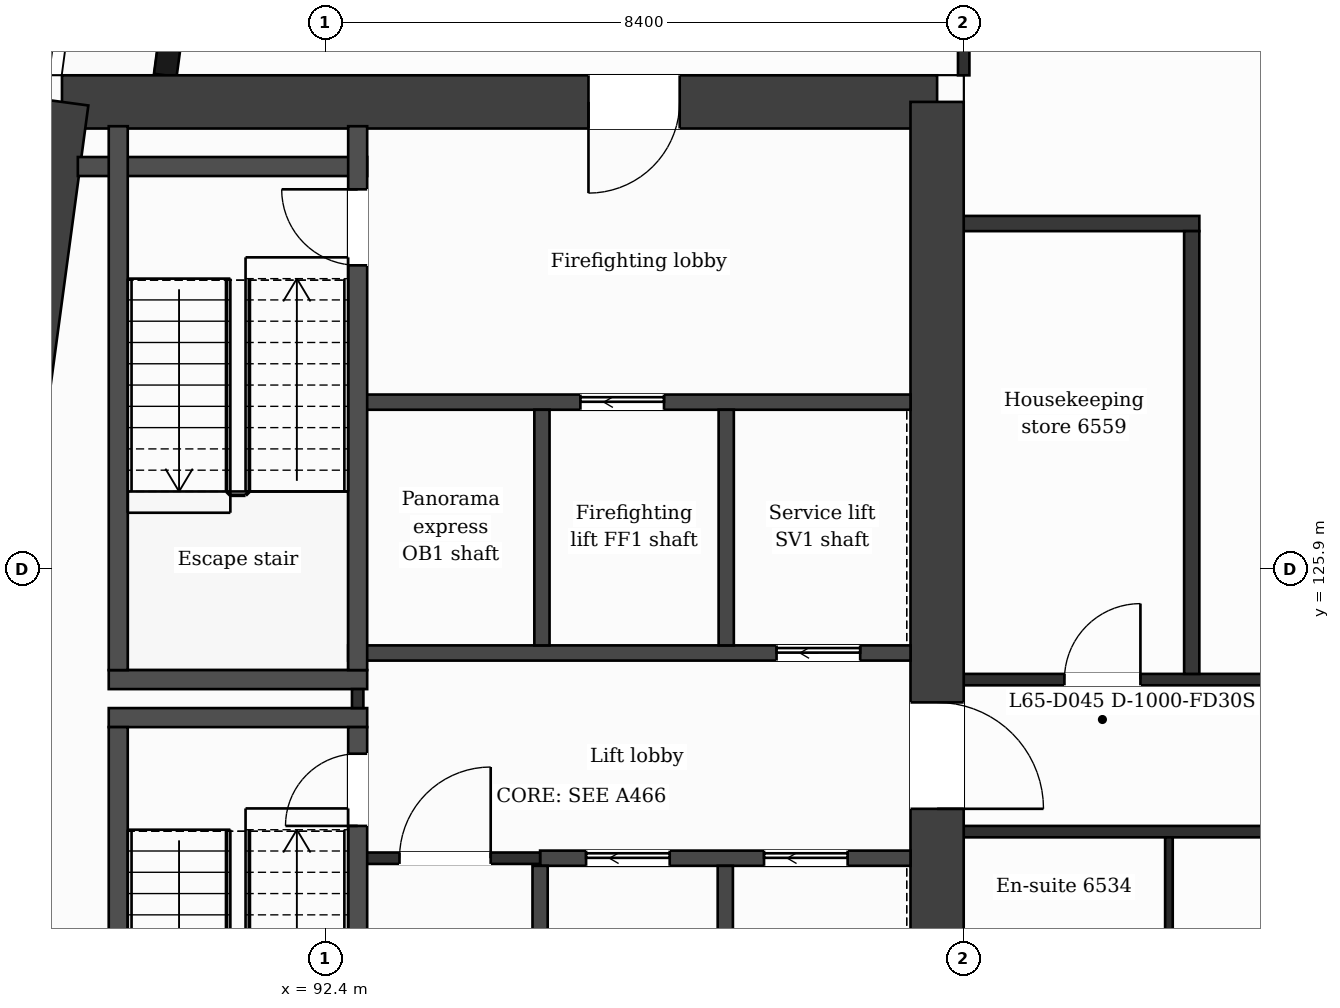
"""IFC4 building model, lengths in metres.
Left out: names, types, materials, properties, quantities, classifications, styles, units other than length and angle.
Written with IfcOpenShell. Run it as: python <this file> out.ifc"""

import sys

from ifc_helpers import new_model, si_unit, direction, frame, frame_2d, origin, place, context, subcontext, project, spatial, rectangle, extrude, element, fill, save


model = new_model("IFC4")
c1 = context("Model", 3, precision=1e-05, world=origin(), true_north=direction((0.0, 1.0)))
c2 = subcontext(c1, "Body", "Model", "MODEL_VIEW")
j1 = project(units=[si_unit("LENGTHUNIT", "METRE"), si_unit("PLANEANGLEUNIT", "RADIAN")], contexts=[c1])
p1 = place(None, origin())
s1 = spatial("IfcSite", under=j1, at=p1, CompositionType="ELEMENT")
p2 = place(p1, origin())
s2 = spatial("IfcBuilding", under=s1, at=p2, CompositionType="ELEMENT")
p3 = place(p2, frame((0.0, 0.0, 270.1)))
s3 = spatial("IfcBuildingStorey", under=s2, at=p3, CompositionType="ELEMENT", Elevation=270.1)
p4 = place(p3, frame((88.937, 132.05, 0.0), z_axis=(0.0, 0.0, 1.0), x_axis=(1.0, 0.0, 0.0)))
e1 = element("IfcWall", 1, at=p4, inside=s3, PredefinedType="SHEAR", context=c2, shape_type="SweptSolid", body=[
    extrude(rectangle(XDim=11.513, YDim=0.7, at=frame_2d((5.757, 0.0))), origin(), (0.0, 0.0, 1.0), 3.7),
])
p5 = place(p4, frame((6.927, 0.0, 0.0)))
e2 = element("IfcOpeningElement", 2, at=p5, cuts=e1, PredefinedType="OPENING", context=c2, shape_type="SweptSolid", body=[
    extrude(rectangle(XDim=1.2, YDim=2.1, at=frame_2d((0.6, 1.05))), frame((0.0, 0.36, 0.0), z_axis=(0.0, -1.0, 0.0), x_axis=(1.0, 0.0, 0.0)), (0.0, 0.0, 1.0), 0.72),
])
p6 = place(p3, frame((100.45, 132.05, 0.0), z_axis=(0.0, 0.0, 1.0), x_axis=(0.0, -1.0, 0.0)))
e3 = element("IfcWall", 3, at=p6, inside=s3, PredefinedType="SHEAR", context=c2, shape_type="SweptSolid", body=[
    extrude(rectangle(XDim=21.3, YDim=0.7, at=frame_2d((10.65, 0.0))), origin(), (0.0, 0.0, 1.0), 3.7),
])
p7 = place(p6, frame((7.9, 0.0, 0.0)))
e4 = element("IfcOpeningElement", 4, at=p7, cuts=e3, PredefinedType="OPENING", context=c2, shape_type="SweptSolid", body=[
    extrude(rectangle(XDim=1.4, YDim=2.1, at=frame_2d((0.7, 1.05))), frame((0.0, 0.36, 0.0), z_axis=(0.0, -1.0, 0.0), x_axis=(1.0, 0.0, 0.0)), (0.0, 0.0, 1.0), 0.72),
])
p8 = place(p3, frame((86.07, 110.75, 0.0), z_axis=(0.0, 0.0, 1.0), x_axis=(0.133406218907, 0.991061441464, 0.0)))
e5 = element("IfcWall", 5, at=p8, inside=s3, PredefinedType="SHEAR", context=c2, shape_type="SweptSolid", body=[
    extrude(rectangle(XDim=21.492, YDim=0.7, at=frame_2d((10.746, 0.0))), origin(), (0.0, 0.0, 1.0), 3.7),
])
p9 = place(p3, frame((91.177, 138.95, 0.0), z_axis=(0.0, 0.0, 1.0), x_axis=(-0.133426664613, -0.991058689065, 0.0)))
e6 = element("IfcWall", 6, at=p9, inside=s3, PredefinedType="SOLIDWALL", context=c2, shape_type="SweptSolid", body=[
    extrude(rectangle(XDim=6.609, YDim=0.3, at=frame_2d((3.305, 0.0))), origin(), (0.0, 0.0, 1.0), 3.38),
])
p10 = place(p9, frame((1.039, 0.0, 0.9)))
e7 = element("IfcOpeningElement", 7, at=p10, cuts=e6, PredefinedType="OPENING", context=c2, shape_type="SweptSolid", body=[
    extrude(rectangle(XDim=1.2, YDim=2.1, at=frame_2d((0.6, 1.05))), frame((0.0, 0.16, 0.0), z_axis=(0.0, -1.0, 0.0), x_axis=(1.0, 0.0, 0.0)), (0.0, 0.0, 1.0), 0.32),
])
p11 = place(p9, frame((4.294, 0.0, 0.0)))
e8 = element("IfcOpeningElement", 8, at=p11, cuts=e6, PredefinedType="OPENING", context=c2, shape_type="SweptSolid", body=[
    extrude(rectangle(XDim=1.2, YDim=2.4, at=frame_2d((0.6, 1.2))), frame((0.0, 0.16, 0.0), z_axis=(0.0, -1.0, 0.0), x_axis=(1.0, 0.0, 0.0)), (0.0, 0.0, 1.0), 0.32),
])
p12 = place(p3, frame((95.227, 122.1, 0.0), z_axis=(0.0, 0.0, 1.0), x_axis=(1.0, 0.0, 0.0)))
e9 = element("IfcWall", 9, at=p12, inside=s3, PredefinedType="PARTITIONING", context=c2, shape_type="SweptSolid", body=[
    extrude(rectangle(XDim=4.873, YDim=0.2, at=frame_2d((2.437, 0.0))), origin(), (0.0, 0.0, 1.0), 3.38),
])
p13 = place(p12, frame((0.605, 0.0, 0.0)))
e10 = element("IfcOpeningElement", 10, at=p13, cuts=e9, PredefinedType="OPENING", context=c2, shape_type="SweptSolid", body=[
    extrude(rectangle(XDim=1.1, YDim=2.1, at=frame_2d((0.55, 1.05))), frame((0.0, 0.11, 0.0), z_axis=(0.0, -1.0, 0.0), x_axis=(1.0, 0.0, 0.0)), (0.0, 0.0, 1.0), 0.22),
])
p14 = place(p12, frame((2.946, 0.0, 0.0)))
e11 = element("IfcOpeningElement", 11, at=p14, cuts=e9, PredefinedType="OPENING", context=c2, shape_type="SweptSolid", body=[
    extrude(rectangle(XDim=1.1, YDim=2.1, at=frame_2d((0.55, 1.05))), frame((0.0, 0.11, 0.0), z_axis=(0.0, -1.0, 0.0), x_axis=(1.0, 0.0, 0.0)), (0.0, 0.0, 1.0), 0.22),
])
p15 = place(p3, frame((92.827, 122.1, 0.0), z_axis=(0.0, 0.0, 1.0), x_axis=(1.0, 0.0, 0.0)))
e12 = element("IfcWall", 12, at=p15, inside=s3, PredefinedType="PARTITIONING", context=c2, shape_type="SweptSolid", body=[
    extrude(rectangle(XDim=2.4, YDim=0.15, at=frame_2d((1.2, 0.0))), origin(), (0.0, 0.0, 1.0), 3.38),
])
p16 = place(p15, frame((0.55, 0.0, 0.0)))
e13 = element("IfcOpeningElement", 13, at=p16, cuts=e12, PredefinedType="OPENING", context=c2, shape_type="SweptSolid", body=[
    extrude(rectangle(XDim=1.2, YDim=2.1, at=frame_2d((0.6, 1.05))), frame((0.0, 0.085, 0.0), z_axis=(0.0, -1.0, 0.0), x_axis=(1.0, 0.0, 0.0)), (0.0, 0.0, 1.0), 0.17),
])
p17 = place(p3, frame((100.8, 122.45, 0.0), z_axis=(0.0, 0.0, 1.0), x_axis=(1.0, 0.0, 0.0)))
e14 = element("IfcWall", 14, at=p17, inside=s3, PredefinedType="PARTITIONING", context=c2, shape_type="SweptSolid", body=[
    extrude(rectangle(XDim=25.2, YDim=0.15, at=frame_2d((12.6, 0.0))), origin(), (0.0, 0.0, 1.0), 3.38),
])
p18 = place(p17, frame((5.55, 0.0, 0.0)))
e15 = element("IfcOpeningElement", 15, at=p18, cuts=e14, PredefinedType="OPENING", context=c2, shape_type="SweptSolid", body=[
    extrude(rectangle(XDim=1.0, YDim=2.1, at=frame_2d((0.5, 1.05))), frame((0.0, 0.085, 0.0), z_axis=(0.0, -1.0, 0.0), x_axis=(1.0, 0.0, 0.0)), (0.0, 0.0, 1.0), 0.17),
])
p19 = place(p17, frame((8.862, 0.0, 0.0)))
e16 = element("IfcOpeningElement", 16, at=p19, cuts=e14, PredefinedType="OPENING", context=c2, shape_type="SweptSolid", body=[
    extrude(rectangle(XDim=0.95, YDim=2.1, at=frame_2d((0.475, 1.05))), frame((0.0, 0.085, 0.0), z_axis=(0.0, -1.0, 0.0), x_axis=(1.0, 0.0, 0.0)), (0.0, 0.0, 1.0), 0.17),
])
p20 = place(p17, frame((15.2, 0.0, 0.0)))
e17 = element("IfcOpeningElement", 17, at=p20, cuts=e14, PredefinedType="OPENING", context=c2, shape_type="SweptSolid", body=[
    extrude(rectangle(XDim=0.95, YDim=2.1, at=frame_2d((0.475, 1.05))), frame((0.0, 0.085, 0.0), z_axis=(0.0, -1.0, 0.0), x_axis=(1.0, 0.0, 0.0)), (0.0, 0.0, 1.0), 0.17),
])
p21 = place(p17, frame((17.325, 0.0, 0.0)))
e18 = element("IfcOpeningElement", 18, at=p21, cuts=e14, PredefinedType="OPENING", context=c2, shape_type="SweptSolid", body=[
    extrude(rectangle(XDim=1.0, YDim=2.1, at=frame_2d((0.5, 1.05))), frame((0.0, 0.085, 0.0), z_axis=(0.0, -1.0, 0.0), x_axis=(1.0, 0.0, 0.0)), (0.0, 0.0, 1.0), 0.17),
])
p22 = place(p17, frame((23.862, 0.0, 0.0)))
e19 = element("IfcOpeningElement", 19, at=p22, cuts=e14, PredefinedType="OPENING", context=c2, shape_type="SweptSolid", body=[
    extrude(rectangle(XDim=0.95, YDim=2.1, at=frame_2d((0.475, 1.05))), frame((0.0, 0.085, 0.0), z_axis=(0.0, -1.0, 0.0), x_axis=(1.0, 0.0, 0.0)), (0.0, 0.0, 1.0), 0.17),
])
for number, where, z_axis, x_axis in (
    (20, (89.552, 123.95, 0.0), (0.0, 0.0, 1.0), (1.0, 0.0, 0.0)),
    (21, (89.552, 124.45, 0.0), (0.0, 0.0, 1.0), (1.0, 0.0, 0.0)),
):
    element("IfcWall", number, at=place(p3, frame(where, z_axis=z_axis, x_axis=x_axis)), inside=s3, PredefinedType="PARTITIONING", context=c2, shape_type="SweptSolid", body=[
        extrude(rectangle(XDim=3.4, YDim=0.25, at=frame_2d((1.7, 0.0))), origin(), (0.0, 0.0, 1.0), 3.38),
    ])
p23 = place(p3, frame((100.8, 124.45, 0.0), z_axis=(0.0, 0.0, 1.0), x_axis=(1.0, 0.0, 0.0)))
e22 = element("IfcWall", 22, at=p23, inside=s3, PredefinedType="PARTITIONING", context=c2, shape_type="SweptSolid", body=[
    extrude(rectangle(XDim=25.2, YDim=0.15, at=frame_2d((12.6, 0.0))), origin(), (0.0, 0.0, 1.0), 3.38),
])
p24 = place(p23, frame((6.125, 0.0, 0.0)))
e23 = element("IfcOpeningElement", 23, at=p24, cuts=e22, PredefinedType="OPENING", context=c2, shape_type="SweptSolid", body=[
    extrude(rectangle(XDim=1.0, YDim=2.1, at=frame_2d((0.5, 1.05))), frame((0.0, 0.085, 0.0), z_axis=(0.0, -1.0, 0.0), x_axis=(1.0, 0.0, 0.0)), (0.0, 0.0, 1.0), 0.17),
])
p25 = place(p23, frame((1.325, 0.0, 0.0)))
e24 = element("IfcOpeningElement", 24, at=p25, cuts=e22, PredefinedType="OPENING", context=c2, shape_type="SweptSolid", body=[
    extrude(rectangle(XDim=1.0, YDim=2.1, at=frame_2d((0.5, 1.05))), frame((0.0, 0.085, 0.0), z_axis=(0.0, -1.0, 0.0), x_axis=(1.0, 0.0, 0.0)), (0.0, 0.0, 1.0), 0.17),
])
p26 = place(p23, frame((11.43, 0.0, 0.0)))
e25 = element("IfcOpeningElement", 25, at=p26, cuts=e22, PredefinedType="OPENING", context=c2, shape_type="SweptSolid", body=[
    extrude(rectangle(XDim=1.0, YDim=2.1, at=frame_2d((0.5, 1.05))), frame((0.0, 0.085, 0.0), z_axis=(0.0, -1.0, 0.0), x_axis=(1.0, 0.0, 0.0)), (0.0, 0.0, 1.0), 0.17),
])
p27 = place(p23, frame((21.17, 0.0, 0.0)))
e26 = element("IfcOpeningElement", 26, at=p27, cuts=e22, PredefinedType="OPENING", context=c2, shape_type="SweptSolid", body=[
    extrude(rectangle(XDim=1.0, YDim=2.1, at=frame_2d((0.5, 1.05))), frame((0.0, 0.085, 0.0), z_axis=(0.0, -1.0, 0.0), x_axis=(1.0, 0.0, 0.0)), (0.0, 0.0, 1.0), 0.17),
])
p28 = place(p3, frame((92.702, 124.8, 0.0), z_axis=(0.0, 0.0, 1.0), x_axis=(1.0, 0.0, 0.0)))
e27 = element("IfcWall", 27, at=p28, inside=s3, PredefinedType="PARTITIONING", context=c2, shape_type="SweptSolid", body=[
    extrude(rectangle(XDim=7.398, YDim=0.2, at=frame_2d((3.699, 0.0))), origin(), (0.0, 0.0, 1.0), 3.38),
])
p29 = place(p28, frame((5.636, 0.0, 0.0)))
e28 = element("IfcOpeningElement", 28, at=p29, cuts=e27, PredefinedType="OPENING", context=c2, shape_type="SweptSolid", body=[
    extrude(rectangle(XDim=1.1, YDim=2.1, at=frame_2d((0.55, 1.05))), frame((0.0, 0.11, 0.0), z_axis=(0.0, -1.0, 0.0), x_axis=(1.0, 0.0, 0.0)), (0.0, 0.0, 1.0), 0.22),
])
p30 = place(p3, frame((92.827, 128.1, 0.0), z_axis=(0.0, 0.0, 1.0), x_axis=(1.0, 0.0, 0.0)))
e29 = element("IfcWall", 29, at=p30, inside=s3, PredefinedType="PARTITIONING", context=c2, shape_type="SweptSolid", body=[
    extrude(rectangle(XDim=7.273, YDim=0.2, at=frame_2d((3.637, 0.0))), origin(), (0.0, 0.0, 1.0), 3.38),
])
p31 = place(p30, frame((2.93, 0.0, 0.0)))
e30 = element("IfcOpeningElement", 30, at=p31, cuts=e29, PredefinedType="OPENING", context=c2, shape_type="SweptSolid", body=[
    extrude(rectangle(XDim=1.1, YDim=2.1, at=frame_2d((0.55, 1.05))), frame((0.0, 0.11, 0.0), z_axis=(0.0, -1.0, 0.0), x_axis=(1.0, 0.0, 0.0)), (0.0, 0.0, 1.0), 0.22),
])
p32 = place(p3, frame((100.8, 130.45, 0.0), z_axis=(0.0, 0.0, 1.0), x_axis=(1.0, 0.0, 0.0)))
e31 = element("IfcWall", 31, at=p32, inside=s3, PredefinedType="PARTITIONING", context=c2, shape_type="SweptSolid", body=[
    extrude(rectangle(XDim=3.1, YDim=0.2, at=frame_2d((1.55, 0.0))), origin(), (0.0, 0.0, 1.0), 3.38),
])
p33 = place(p3, frame((89.146, 131.2, 0.0), z_axis=(0.0, 0.0, 1.0), x_axis=(1.0, 0.0, 0.0)))
e32 = element("IfcWall", 32, at=p33, inside=s3, PredefinedType="PARTITIONING", context=c2, shape_type="SweptSolid", body=[
    extrude(rectangle(XDim=3.806, YDim=0.25, at=frame_2d((1.903, 0.0))), origin(), (0.0, 0.0, 1.0), 3.38),
])
for number, where, z_axis, x_axis in (
    (33, (89.677, 116.67, 0.0), (0.0, 0.0, 1.0), (0.0, 1.0, 0.0)),
    (34, (89.677, 124.575, 0.0), (0.0, 0.0, 1.0), (0.0, 1.0, 0.0)),
):
    element("IfcWall", number, at=place(p3, frame(where, z_axis=z_axis, x_axis=x_axis)), inside=s3, PredefinedType="PARTITIONING", context=c2, shape_type="SweptSolid", body=[
        extrude(rectangle(XDim=7.155, YDim=0.25, at=frame_2d((3.578, 0.0))), origin(), (0.0, 0.0, 1.0), 3.38),
    ])
p34 = place(p3, frame((92.827, 124.075, 0.0), z_axis=(0.0, 0.0, 1.0), x_axis=(0.0, 1.0, 0.0)))
e35 = element("IfcWall", 35, at=p34, inside=s3, PredefinedType="PARTITIONING", context=c2, shape_type="SweptSolid", body=[
    extrude(rectangle(XDim=0.25, YDim=0.15, at=frame_2d((0.125, 0.0))), origin(), (0.0, 0.0, 1.0), 3.38),
])
p35 = place(p3, frame((92.827, 116.67, 0.0), z_axis=(0.0, 0.0, 1.0), x_axis=(0.0, 1.0, 0.0)))
e36 = element("IfcWall", 36, at=p35, inside=s3, PredefinedType="PARTITIONING", context=c2, shape_type="SweptSolid", body=[
    extrude(rectangle(XDim=7.155, YDim=0.25, at=frame_2d((3.578, 0.0))), origin(), (0.0, 0.0, 1.0), 3.38),
])
p36 = place(p35, frame((5.855, 0.0, 0.0)))
e37 = element("IfcOpeningElement", 37, at=p36, cuts=e36, PredefinedType="OPENING", context=c2, shape_type="SweptSolid", body=[
    extrude(rectangle(XDim=0.95, YDim=2.1, at=frame_2d((0.475, 1.05))), frame((0.0, 0.135, 0.0), z_axis=(0.0, -1.0, 0.0), x_axis=(1.0, 0.0, 0.0)), (0.0, 0.0, 1.0), 0.27),
])
p37 = place(p3, frame((92.827, 124.575, 0.0), z_axis=(0.0, 0.0, 1.0), x_axis=(0.0, 1.0, 0.0)))
e38 = element("IfcWall", 38, at=p37, inside=s3, PredefinedType="PARTITIONING", context=c2, shape_type="SweptSolid", body=[
    extrude(rectangle(XDim=7.155, YDim=0.25, at=frame_2d((3.578, 0.0))), origin(), (0.0, 0.0, 1.0), 3.38),
])
p38 = place(p37, frame((5.325, 0.0, 0.0)))
e39 = element("IfcOpeningElement", 39, at=p38, cuts=e38, PredefinedType="OPENING", context=c2, shape_type="SweptSolid", body=[
    extrude(rectangle(XDim=1.0, YDim=2.1, at=frame_2d((0.5, 1.05))), frame((0.0, 0.135, 0.0), z_axis=(0.0, -1.0, 0.0), x_axis=(1.0, 0.0, 0.0)), (0.0, 0.0, 1.0), 0.27),
])
p39 = place(p3, frame((95.227, 116.67, 0.0), z_axis=(0.0, 0.0, 1.0), x_axis=(0.0, 1.0, 0.0)))
e40 = element("IfcWall", 40, at=p39, inside=s3, PredefinedType="PARTITIONING", context=c2, shape_type="SweptSolid", body=[
    extrude(rectangle(XDim=5.33, YDim=0.2, at=frame_2d((2.665, 0.0))), origin(), (0.0, 0.0, 1.0), 3.38),
])
p40 = place(p39, frame((0.88, 0.0, 0.0)))
e41 = element("IfcOpeningElement", 41, at=p40, cuts=e40, PredefinedType="OPENING", context=c2, shape_type="SweptSolid", body=[
    extrude(rectangle(XDim=0.9, YDim=2.1, at=frame_2d((0.45, 1.05))), frame((0.0, 0.11, 0.0), z_axis=(0.0, -1.0, 0.0), x_axis=(1.0, 0.0, 0.0)), (0.0, 0.0, 1.0), 0.22),
])
for number, where, z_axis, x_axis in (
    (42, (95.251, 124.9, 0.0), (0.0, 0.0, 1.0), (0.0, 1.0, 0.0)),
    (43, (97.664, 118.9, 0.0), (0.0, 0.0, 1.0), (0.0, 1.0, 0.0)),
    (44, (97.676, 124.9, 0.0), (0.0, 0.0, 1.0), (0.0, 1.0, 0.0)),
):
    element("IfcWall", number, at=place(p3, frame(where, z_axis=z_axis, x_axis=x_axis)), inside=s3, PredefinedType="PARTITIONING", context=c2, shape_type="SweptSolid", body=[
        extrude(rectangle(XDim=3.1, YDim=0.2, at=frame_2d((1.55, 0.0))), origin(), (0.0, 0.0, 1.0), 3.38),
    ])
p41 = place(p3, frame((100.8, 132.4, 0.0), z_axis=(0.0, 0.0, 1.0), x_axis=(0.0, 1.0, 0.0)))
e45 = element("IfcWall", 45, at=p41, inside=s3, PredefinedType="PARTITIONING", context=c2, shape_type="SweptSolid", body=[
    extrude(rectangle(XDim=1.325, YDim=0.15, at=frame_2d((0.663, 0.0))), origin(), (0.0, 0.0, 1.0), 3.38),
])
p42 = place(p3, frame((103.5, 120.4, 0.0), z_axis=(0.0, 0.0, 1.0), x_axis=(0.0, 1.0, 0.0)))
e46 = element("IfcWall", 46, at=p42, inside=s3, PredefinedType="PARTITIONING", context=c2, shape_type="SweptSolid", body=[
    extrude(rectangle(XDim=1.975, YDim=0.1, at=frame_2d((0.988, 0.0))), origin(), (0.0, 0.0, 1.0), 3.38),
])
p43 = place(p3, frame((103.8, 124.525, 0.0), z_axis=(0.0, 0.0, 1.0), x_axis=(0.0, 1.0, 0.0)))
e47 = element("IfcWall", 47, at=p43, inside=s3, PredefinedType="PARTITIONING", context=c2, shape_type="SweptSolid", body=[
    extrude(rectangle(XDim=5.825, YDim=0.2, at=frame_2d((2.913, 0.0))), origin(), (0.0, 0.0, 1.0), 3.38),
])
p44 = place(p16, origin())
e48 = element("IfcDoor", 48, at=p44, inside=s3, OperationType="SINGLE_SWING_RIGHT", PredefinedType="DOOR", context=c2, shape_type="SweptSolid", body=[
    extrude(rectangle(XDim=1.2, YDim=2.1, at=frame_2d((0.6, 1.05))), frame((0.0, 0.025, 0.0), z_axis=(0.0, -1.0, 0.0), x_axis=(1.0, 0.0, 0.0)), (0.0, 0.0, 1.0), 0.05),
])
fill(e13, e48)
p45 = place(p13, origin())
e49 = element("IfcDoor", 49, at=p45, inside=s3, OperationType="SLIDING_TO_LEFT", PredefinedType="DOOR", context=c2, shape_type="SweptSolid", body=[
    extrude(rectangle(XDim=1.1, YDim=2.1, at=frame_2d((0.55, 1.05))), frame((0.0, 0.025, 0.0), z_axis=(0.0, -1.0, 0.0), x_axis=(1.0, 0.0, 0.0)), (0.0, 0.0, 1.0), 0.05),
])
fill(e10, e49)
p46 = place(p14, origin())
e50 = element("IfcDoor", 50, at=p46, inside=s3, OperationType="SLIDING_TO_LEFT", PredefinedType="DOOR", context=c2, shape_type="SweptSolid", body=[
    extrude(rectangle(XDim=1.1, YDim=2.1, at=frame_2d((0.55, 1.05))), frame((0.0, 0.025, 0.0), z_axis=(0.0, -1.0, 0.0), x_axis=(1.0, 0.0, 0.0)), (0.0, 0.0, 1.0), 0.05),
])
fill(e11, e50)
p47 = place(p31, origin())
e51 = element("IfcDoor", 51, at=p47, inside=s3, OperationType="SLIDING_TO_LEFT", PredefinedType="DOOR", context=c2, shape_type="SweptSolid", body=[
    extrude(rectangle(XDim=1.1, YDim=2.1, at=frame_2d((0.55, 1.05))), frame((0.0, 0.025, 0.0), z_axis=(0.0, -1.0, 0.0), x_axis=(1.0, 0.0, 0.0)), (0.0, 0.0, 1.0), 0.05),
])
fill(e30, e51)
p48 = place(p29, origin())
e52 = element("IfcDoor", 52, at=p48, inside=s3, OperationType="SLIDING_TO_LEFT", PredefinedType="DOOR", context=c2, shape_type="SweptSolid", body=[
    extrude(rectangle(XDim=1.1, YDim=2.1, at=frame_2d((0.55, 1.05))), frame((0.0, 0.025, 0.0), z_axis=(0.0, -1.0, 0.0), x_axis=(1.0, 0.0, 0.0)), (0.0, 0.0, 1.0), 0.05),
])
fill(e28, e52)
p49 = place(p36, origin())
e53 = element("IfcDoor", 53, at=p49, inside=s3, OperationType="SINGLE_SWING_LEFT", PredefinedType="DOOR", context=c2, shape_type="SweptSolid", body=[
    extrude(rectangle(XDim=0.95, YDim=2.1, at=frame_2d((0.475, 1.05))), frame((0.0, 0.025, 0.0), z_axis=(0.0, -1.0, 0.0), x_axis=(1.0, 0.0, 0.0)), (0.0, 0.0, 1.0), 0.05),
])
fill(e37, e53)
p50 = place(p38, origin())
e54 = element("IfcDoor", 54, at=p50, inside=s3, OperationType="SINGLE_SWING_RIGHT", PredefinedType="DOOR", context=c2, shape_type="SweptSolid", body=[
    extrude(rectangle(XDim=1.0, YDim=2.1, at=frame_2d((0.5, 1.05))), frame((0.0, 0.025, 0.0), z_axis=(0.0, -1.0, 0.0), x_axis=(1.0, 0.0, 0.0)), (0.0, 0.0, 1.0), 0.05),
])
fill(e39, e54)
p51 = place(p25, origin())
e55 = element("IfcDoor", 55, at=p51, inside=s3, OperationType="SINGLE_SWING_RIGHT", PredefinedType="DOOR", context=c2, shape_type="SweptSolid", body=[
    extrude(rectangle(XDim=1.0, YDim=2.1, at=frame_2d((0.5, 1.05))), frame((0.0, 0.025, 0.0), z_axis=(0.0, -1.0, 0.0), x_axis=(1.0, 0.0, 0.0)), (0.0, 0.0, 1.0), 0.05),
])
fill(e24, e55)
p52 = place(p5, origin())
e56 = element("IfcDoor", 56, at=p52, inside=s3, OperationType="SINGLE_SWING_LEFT", PredefinedType="DOOR", context=c2, shape_type="SweptSolid", body=[
    extrude(rectangle(XDim=1.2, YDim=2.1, at=frame_2d((0.6, 1.05))), frame((0.0, 0.025, 0.0), z_axis=(0.0, -1.0, 0.0), x_axis=(1.0, 0.0, 0.0)), (0.0, 0.0, 1.0), 0.05),
])
fill(e2, e56)
p53 = place(p7, origin())
e57 = element("IfcDoor", 57, at=p53, inside=s3, OperationType="SINGLE_SWING_RIGHT", PredefinedType="DOOR", context=c2, shape_type="SweptSolid", body=[
    extrude(rectangle(XDim=1.4, YDim=2.1, at=frame_2d((0.7, 1.05))), frame((0.0, 0.025, 0.0), z_axis=(0.0, -1.0, 0.0), x_axis=(1.0, 0.0, 0.0)), (0.0, 0.0, 1.0), 0.05),
])
fill(e4, e57)
save(model, sys.argv[1])
